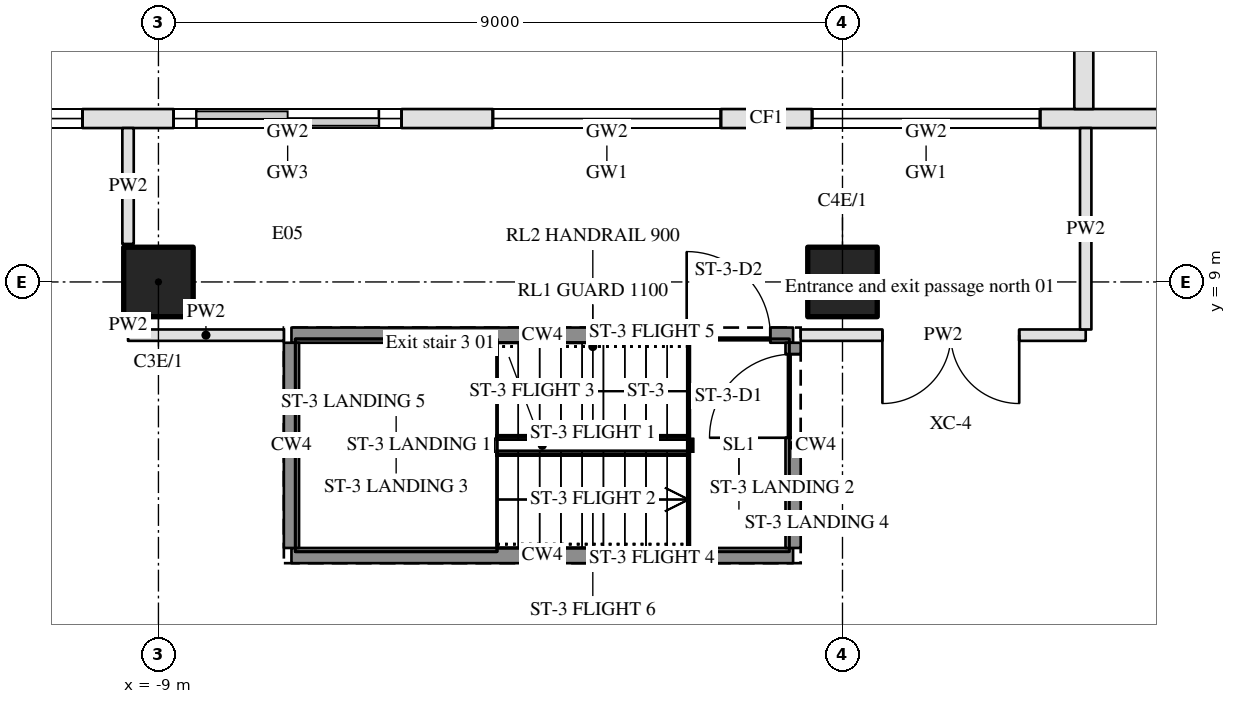
"""IFC4 building model, lengths in metres.
Left out: names, types, materials, properties, quantities, classifications, styles, units other than length and angle.
Written with IfcOpenShell. Run it as: python <this file> out.ifc"""

import sys

from ifc_helpers import new_model, si_unit, direction, frame, frame_2d, origin, origin_2d, place, context, subcontext, project, spatial, rectangle, hollow_circle, extrude, element, fill, save


model = new_model("IFC4")
c1 = context("Model", 3, precision=1e-05, world=origin(), true_north=direction((0.0, 1.0)))
c2 = subcontext(c1, "Body", "Model", "MODEL_VIEW")
j1 = project(units=[si_unit("LENGTHUNIT", "METRE"), si_unit("PLANEANGLEUNIT", "RADIAN")], contexts=[c1])
p1 = place(None, origin())
s1 = spatial("IfcSite", under=j1, at=p1, CompositionType="ELEMENT")
p2 = place(p1, origin())
s2 = spatial("IfcBuilding", under=s1, at=p2, CompositionType="ELEMENT")
p3 = place(p2, origin())
s3 = spatial("IfcBuildingStorey", under=s2, at=p3, CompositionType="ELEMENT", Elevation=0.0)
for number, where, z_axis, x_axis in (
    (1, (-9.0, 9.0, 0.0), (0.0, 0.0, 1.0), (1.0, 0.0, 0.0)),
    (2, (0.0, 9.0, 0.0), (0.0, 0.0, 1.0), (1.0, 0.0, 0.0)),
):
    element("IfcColumn", number, at=place(p3, frame(where, z_axis=z_axis, x_axis=x_axis)), inside=s3, PredefinedType="COLUMN", context=c2, shape_type="SweptSolid", body=[
        extrude(hollow_circle(Radius=0.457, WallThickness=0.05, at=origin_2d()), origin(), (0.0, 0.0, 1.0), 10.8),
    ])
p4 = place(p3, frame((20.125, 11.15, 0.0), z_axis=(0.0, 0.0, 1.0), x_axis=(-1.0, 0.0, 0.0)))
e3 = element("IfcWall", 3, at=p4, inside=s3, PredefinedType="STANDARD", context=c2, shape_type="SweptSolid", body=[
    extrude(rectangle(XDim=42.25, YDim=0.25, at=frame_2d((21.125, 0.0))), origin(), (0.0, 0.0, 1.0), 10.0),
])
p5 = place(p4, frame((0.725, 0.0, 0.15)))
e4 = element("IfcOpeningElement", 4, at=p5, cuts=e3, PredefinedType="OPENING", context=c2, shape_type="SweptSolid", body=[
    extrude(rectangle(XDim=3.0, YDim=4.2, at=frame_2d((1.5, 2.1))), frame((0.0, 0.135, 0.0), z_axis=(0.0, -1.0, 0.0), x_axis=(1.0, 0.0, 0.0)), (0.0, 0.0, 1.0), 0.27),
])
p6 = place(p4, frame((0.725, 0.0, 4.95)))
e5 = element("IfcOpeningElement", 5, at=p6, cuts=e3, PredefinedType="OPENING", context=c2, shape_type="SweptSolid", body=[
    extrude(rectangle(XDim=3.0, YDim=4.4, at=frame_2d((1.5, 2.2))), frame((0.0, 0.135, 0.0), z_axis=(0.0, -1.0, 0.0), x_axis=(1.0, 0.0, 0.0)), (0.0, 0.0, 1.0), 0.27),
])
p7 = place(p4, frame((4.925, 0.0, 0.15)))
e6 = element("IfcOpeningElement", 6, at=p7, cuts=e3, PredefinedType="OPENING", context=c2, shape_type="SweptSolid", body=[
    extrude(rectangle(XDim=3.0, YDim=4.2, at=frame_2d((1.5, 2.1))), frame((0.0, 0.135, 0.0), z_axis=(0.0, -1.0, 0.0), x_axis=(1.0, 0.0, 0.0)), (0.0, 0.0, 1.0), 0.27),
])
p8 = place(p4, frame((4.925, 0.0, 4.95)))
e7 = element("IfcOpeningElement", 7, at=p8, cuts=e3, PredefinedType="OPENING", context=c2, shape_type="SweptSolid", body=[
    extrude(rectangle(XDim=3.0, YDim=4.4, at=frame_2d((1.5, 2.2))), frame((0.0, 0.135, 0.0), z_axis=(0.0, -1.0, 0.0), x_axis=(1.0, 0.0, 0.0)), (0.0, 0.0, 1.0), 0.27),
])
p9 = place(p4, frame((9.125, 0.0, 0.15)))
e8 = element("IfcOpeningElement", 8, at=p9, cuts=e3, PredefinedType="OPENING", context=c2, shape_type="SweptSolid", body=[
    extrude(rectangle(XDim=3.0, YDim=4.2, at=frame_2d((1.5, 2.1))), frame((0.0, 0.135, 0.0), z_axis=(0.0, -1.0, 0.0), x_axis=(1.0, 0.0, 0.0)), (0.0, 0.0, 1.0), 0.27),
])
p10 = place(p4, frame((9.125, 0.0, 4.95)))
e9 = element("IfcOpeningElement", 9, at=p10, cuts=e3, PredefinedType="OPENING", context=c2, shape_type="SweptSolid", body=[
    extrude(rectangle(XDim=3.0, YDim=4.4, at=frame_2d((1.5, 2.2))), frame((0.0, 0.135, 0.0), z_axis=(0.0, -1.0, 0.0), x_axis=(1.0, 0.0, 0.0)), (0.0, 0.0, 1.0), 0.27),
])
p11 = place(p4, frame((13.925, 0.0, 0.0)))
e10 = element("IfcOpeningElement", 10, at=p11, cuts=e3, PredefinedType="OPENING", context=c2, shape_type="SweptSolid", body=[
    extrude(rectangle(XDim=1.8, YDim=2.4, at=frame_2d((0.9, 1.2))), frame((0.0, 0.135, 0.0), z_axis=(0.0, -1.0, 0.0), x_axis=(1.0, 0.0, 0.0)), (0.0, 0.0, 1.0), 0.27),
])
p12 = place(p4, frame((17.525, 0.0, 0.15)))
e11 = element("IfcOpeningElement", 11, at=p12, cuts=e3, PredefinedType="OPENING", context=c2, shape_type="SweptSolid", body=[
    extrude(rectangle(XDim=3.0, YDim=4.2, at=frame_2d((1.5, 2.1))), frame((0.0, 0.135, 0.0), z_axis=(0.0, -1.0, 0.0), x_axis=(1.0, 0.0, 0.0)), (0.0, 0.0, 1.0), 0.27),
])
p13 = place(p4, frame((17.525, 0.0, 4.95)))
e12 = element("IfcOpeningElement", 12, at=p13, cuts=e3, PredefinedType="OPENING", context=c2, shape_type="SweptSolid", body=[
    extrude(rectangle(XDim=3.0, YDim=4.4, at=frame_2d((1.5, 2.2))), frame((0.0, 0.135, 0.0), z_axis=(0.0, -1.0, 0.0), x_axis=(1.0, 0.0, 0.0)), (0.0, 0.0, 1.0), 0.27),
])
p14 = place(p4, frame((21.725, 0.0, 0.15)))
e13 = element("IfcOpeningElement", 13, at=p14, cuts=e3, PredefinedType="OPENING", context=c2, shape_type="SweptSolid", body=[
    extrude(rectangle(XDim=3.0, YDim=4.2, at=frame_2d((1.5, 2.1))), frame((0.0, 0.135, 0.0), z_axis=(0.0, -1.0, 0.0), x_axis=(1.0, 0.0, 0.0)), (0.0, 0.0, 1.0), 0.27),
])
p15 = place(p4, frame((21.725, 0.0, 4.95)))
e14 = element("IfcOpeningElement", 14, at=p15, cuts=e3, PredefinedType="OPENING", context=c2, shape_type="SweptSolid", body=[
    extrude(rectangle(XDim=3.0, YDim=4.4, at=frame_2d((1.5, 2.2))), frame((0.0, 0.135, 0.0), z_axis=(0.0, -1.0, 0.0), x_axis=(1.0, 0.0, 0.0)), (0.0, 0.0, 1.0), 0.27),
])
p16 = place(p4, frame((26.225, 0.0, 0.0)))
e15 = element("IfcOpeningElement", 15, at=p16, cuts=e3, PredefinedType="OPENING", context=c2, shape_type="SweptSolid", body=[
    extrude(rectangle(XDim=2.4, YDim=2.6, at=frame_2d((1.2, 1.3))), frame((0.0, 0.135, 0.0), z_axis=(0.0, -1.0, 0.0), x_axis=(1.0, 0.0, 0.0)), (0.0, 0.0, 1.0), 0.27),
])
p17 = place(p4, frame((25.925, 0.0, 2.9)))
e16 = element("IfcOpeningElement", 16, at=p17, cuts=e3, PredefinedType="OPENING", context=c2, shape_type="SweptSolid", body=[
    extrude(rectangle(XDim=3.0, YDim=1.45, at=frame_2d((1.5, 0.725))), frame((0.0, 0.135, 0.0), z_axis=(0.0, -1.0, 0.0), x_axis=(1.0, 0.0, 0.0)), (0.0, 0.0, 1.0), 0.27),
])
p18 = place(p4, frame((25.925, 0.0, 4.95)))
e17 = element("IfcOpeningElement", 17, at=p18, cuts=e3, PredefinedType="OPENING", context=c2, shape_type="SweptSolid", body=[
    extrude(rectangle(XDim=3.0, YDim=4.4, at=frame_2d((1.5, 2.2))), frame((0.0, 0.135, 0.0), z_axis=(0.0, -1.0, 0.0), x_axis=(1.0, 0.0, 0.0)), (0.0, 0.0, 1.0), 0.27),
])
p19 = place(p4, frame((30.125, 0.0, 0.15)))
e18 = element("IfcOpeningElement", 18, at=p19, cuts=e3, PredefinedType="OPENING", context=c2, shape_type="SweptSolid", body=[
    extrude(rectangle(XDim=3.0, YDim=4.2, at=frame_2d((1.5, 2.1))), frame((0.0, 0.135, 0.0), z_axis=(0.0, -1.0, 0.0), x_axis=(1.0, 0.0, 0.0)), (0.0, 0.0, 1.0), 0.27),
])
p20 = place(p4, frame((30.125, 0.0, 4.95)))
e19 = element("IfcOpeningElement", 19, at=p20, cuts=e3, PredefinedType="OPENING", context=c2, shape_type="SweptSolid", body=[
    extrude(rectangle(XDim=3.0, YDim=4.4, at=frame_2d((1.5, 2.2))), frame((0.0, 0.135, 0.0), z_axis=(0.0, -1.0, 0.0), x_axis=(1.0, 0.0, 0.0)), (0.0, 0.0, 1.0), 0.27),
])
p21 = place(p4, frame((34.325, 0.0, 0.15)))
e20 = element("IfcOpeningElement", 20, at=p21, cuts=e3, PredefinedType="OPENING", context=c2, shape_type="SweptSolid", body=[
    extrude(rectangle(XDim=3.0, YDim=4.2, at=frame_2d((1.5, 2.1))), frame((0.0, 0.135, 0.0), z_axis=(0.0, -1.0, 0.0), x_axis=(1.0, 0.0, 0.0)), (0.0, 0.0, 1.0), 0.27),
])
p22 = place(p4, frame((34.325, 0.0, 4.95)))
e21 = element("IfcOpeningElement", 21, at=p22, cuts=e3, PredefinedType="OPENING", context=c2, shape_type="SweptSolid", body=[
    extrude(rectangle(XDim=3.0, YDim=4.4, at=frame_2d((1.5, 2.2))), frame((0.0, 0.135, 0.0), z_axis=(0.0, -1.0, 0.0), x_axis=(1.0, 0.0, 0.0)), (0.0, 0.0, 1.0), 0.27),
])
p23 = place(p4, frame((38.525, 0.0, 0.15)))
e22 = element("IfcOpeningElement", 22, at=p23, cuts=e3, PredefinedType="OPENING", context=c2, shape_type="SweptSolid", body=[
    extrude(rectangle(XDim=3.0, YDim=4.2, at=frame_2d((1.5, 2.1))), frame((0.0, 0.135, 0.0), z_axis=(0.0, -1.0, 0.0), x_axis=(1.0, 0.0, 0.0)), (0.0, 0.0, 1.0), 0.27),
])
p24 = place(p4, frame((38.525, 0.0, 4.95)))
e23 = element("IfcOpeningElement", 23, at=p24, cuts=e3, PredefinedType="OPENING", context=c2, shape_type="SweptSolid", body=[
    extrude(rectangle(XDim=3.0, YDim=4.4, at=frame_2d((1.5, 2.2))), frame((0.0, 0.135, 0.0), z_axis=(0.0, -1.0, 0.0), x_axis=(1.0, 0.0, 0.0)), (0.0, 0.0, 1.0), 0.27),
])
p25 = place(p3, frame((3.175, 11.275, 0.0), z_axis=(0.0, 0.0, 1.0), x_axis=(0.0, 1.0, 0.0)))
e24 = element("IfcWall", 24, at=p25, inside=s3, PredefinedType="STANDARD", context=c2, shape_type="SweptSolid", body=[
    extrude(rectangle(XDim=12.0, YDim=0.25, at=frame_2d((6.0, 0.0))), origin(), (0.0, 0.0, 1.0), 10.0),
])
p26 = place(p3, frame((-7.25, 5.4, 0.0), z_axis=(0.0, 0.0, 1.0), x_axis=(1.0, 0.0, 0.0)))
e25 = element("IfcWall", 25, at=p26, inside=s3, PredefinedType="SHEAR", context=c2, shape_type="SweptSolid", body=[
    extrude(rectangle(XDim=6.6, YDim=0.2, at=frame_2d((3.3, 0.0))), origin(), (0.0, 0.0, 1.0), 10.8),
])
p27 = place(p3, frame((-9.4, 8.3, 0.0), z_axis=(0.0, 0.0, 1.0), x_axis=(1.0, 0.0, 0.0)))
e26 = element("IfcWall", 26, at=p27, inside=s3, PredefinedType="PARTITIONING", context=c2, shape_type="SweptSolid", body=[
    extrude(rectangle(XDim=2.05, YDim=0.15, at=frame_2d((1.025, 0.0))), origin(), (0.0, 0.0, 1.0), 9.86),
])
p28 = place(p3, frame((-7.25, 8.3, 0.0), z_axis=(0.0, 0.0, 1.0), x_axis=(1.0, 0.0, 0.0)))
e27 = element("IfcWall", 27, at=p28, inside=s3, PredefinedType="SHEAR", context=c2, shape_type="SweptSolid", body=[
    extrude(rectangle(XDim=6.6, YDim=0.2, at=frame_2d((3.3, 0.0))), origin(), (0.0, 0.0, 1.0), 10.8),
])
p29 = place(p28, frame((5.2, 0.0, 0.0)))
e28 = element("IfcOpeningElement", 28, at=p29, cuts=e27, PredefinedType="OPENING", context=c2, shape_type="SweptSolid", body=[
    extrude(rectangle(XDim=1.1, YDim=2.1, at=frame_2d((0.55, 1.05))), frame((0.0, 0.11, 0.0), z_axis=(0.0, -1.0, 0.0), x_axis=(1.0, 0.0, 0.0)), (0.0, 0.0, 1.0), 0.22),
])
p30 = place(p3, frame((3.2, 8.3, 0.0), z_axis=(0.0, 0.0, 1.0), x_axis=(-1.0, 0.0, 0.0)))
e29 = element("IfcWall", 29, at=p30, inside=s3, PredefinedType="PARTITIONING", context=c2, shape_type="SweptSolid", body=[
    extrude(rectangle(XDim=3.75, YDim=0.15, at=frame_2d((1.875, 0.0))), origin(), (0.0, 0.0, 1.0), 9.86),
])
p31 = place(p30, frame((0.875, 0.0, 0.0)))
e30 = element("IfcOpeningElement", 30, at=p31, cuts=e29, PredefinedType="OPENING", context=c2, shape_type="SweptSolid", body=[
    extrude(rectangle(XDim=1.8, YDim=2.1, at=frame_2d((0.9, 1.05))), frame((0.0, 0.085, 0.0), z_axis=(0.0, -1.0, 0.0), x_axis=(1.0, 0.0, 0.0)), (0.0, 0.0, 1.0), 0.17),
])
p32 = place(p3, frame((-9.4, 8.375, 0.0), z_axis=(0.0, 0.0, 1.0), x_axis=(0.0, 1.0, 0.0)))
e31 = element("IfcWall", 31, at=p32, inside=s3, PredefinedType="PARTITIONING", context=c2, shape_type="SweptSolid", body=[
    extrude(rectangle(XDim=0.125, YDim=0.15, at=frame_2d((0.062, 0.0))), origin(), (0.0, 0.0, 1.0), 9.86),
])
p33 = place(p3, frame((-9.4, 9.5, 0.0), z_axis=(0.0, 0.0, 1.0), x_axis=(0.0, 1.0, 0.0)))
e32 = element("IfcWall", 32, at=p33, inside=s3, PredefinedType="PARTITIONING", context=c2, shape_type="SweptSolid", body=[
    extrude(rectangle(XDim=1.525, YDim=0.15, at=frame_2d((0.762, 0.0))), origin(), (0.0, 0.0, 1.0), 9.86),
])
p34 = place(p3, frame((-7.25, 5.5, 0.0), z_axis=(0.0, 0.0, 1.0), x_axis=(0.0, 1.0, 0.0)))
e33 = element("IfcWall", 33, at=p34, inside=s3, PredefinedType="SHEAR", context=c2, shape_type="SweptSolid", body=[
    extrude(rectangle(XDim=2.7, YDim=0.2, at=frame_2d((1.35, 0.0))), origin(), (0.0, 0.0, 1.0), 10.8),
])
p35 = place(p3, frame((-0.65, 5.5, 0.0), z_axis=(0.0, 0.0, 1.0), x_axis=(0.0, 1.0, 0.0)))
e34 = element("IfcWall", 34, at=p35, inside=s3, PredefinedType="SHEAR", context=c2, shape_type="SweptSolid", body=[
    extrude(rectangle(XDim=2.7, YDim=0.2, at=frame_2d((1.35, 0.0))), origin(), (0.0, 0.0, 1.0), 10.8),
])
p36 = place(p35, frame((1.45, 0.0, 0.0)))
e35 = element("IfcOpeningElement", 35, at=p36, cuts=e34, PredefinedType="OPENING", context=c2, shape_type="SweptSolid", body=[
    extrude(rectangle(XDim=1.1, YDim=2.1, at=frame_2d((0.55, 1.05))), frame((0.0, 0.11, 0.0), z_axis=(0.0, -1.0, 0.0), x_axis=(1.0, 0.0, 0.0)), (0.0, 0.0, 1.0), 0.22),
])
p37 = place(p3, frame((3.2, 8.375, 0.0), z_axis=(0.0, 0.0, 1.0), x_axis=(0.0, 1.0, 0.0)))
e36 = element("IfcWall", 36, at=p37, inside=s3, PredefinedType="PARTITIONING", context=c2, shape_type="SweptSolid", body=[
    extrude(rectangle(XDim=2.65, YDim=0.15, at=frame_2d((1.325, 0.0))), origin(), (0.0, 0.0, 1.0), 9.86),
])
p38 = place(p12, origin())
e37 = element("IfcWindow", 37, at=p38, inside=s3, PartitioningType="DOUBLE_PANEL_HORIZONTAL", PredefinedType="WINDOW", context=c2, shape_type="SweptSolid", body=[
    extrude(rectangle(XDim=3.0, YDim=4.2, at=frame_2d((1.5, 2.1))), frame((0.0, 0.03, 0.0), z_axis=(0.0, -1.0, 0.0), x_axis=(1.0, 0.0, 0.0)), (0.0, 0.0, 1.0), 0.06),
])
fill(e11, e37)
p39 = place(p13, origin())
e38 = element("IfcWindow", 38, at=p39, inside=s3, PartitioningType="DOUBLE_PANEL_HORIZONTAL", PredefinedType="WINDOW", context=c2, shape_type="SweptSolid", body=[
    extrude(rectangle(XDim=3.0, YDim=4.4, at=frame_2d((1.5, 2.2))), frame((0.0, 0.03, 0.0), z_axis=(0.0, -1.0, 0.0), x_axis=(1.0, 0.0, 0.0)), (0.0, 0.0, 1.0), 0.06),
])
fill(e12, e38)
p40 = place(p14, origin())
e39 = element("IfcWindow", 39, at=p40, inside=s3, PartitioningType="DOUBLE_PANEL_HORIZONTAL", PredefinedType="WINDOW", context=c2, shape_type="SweptSolid", body=[
    extrude(rectangle(XDim=3.0, YDim=4.2, at=frame_2d((1.5, 2.1))), frame((0.0, 0.03, 0.0), z_axis=(0.0, -1.0, 0.0), x_axis=(1.0, 0.0, 0.0)), (0.0, 0.0, 1.0), 0.06),
])
fill(e13, e39)
p41 = place(p15, origin())
e40 = element("IfcWindow", 40, at=p41, inside=s3, PartitioningType="DOUBLE_PANEL_HORIZONTAL", PredefinedType="WINDOW", context=c2, shape_type="SweptSolid", body=[
    extrude(rectangle(XDim=3.0, YDim=4.4, at=frame_2d((1.5, 2.2))), frame((0.0, 0.03, 0.0), z_axis=(0.0, -1.0, 0.0), x_axis=(1.0, 0.0, 0.0)), (0.0, 0.0, 1.0), 0.06),
])
fill(e14, e40)
p42 = place(p16, origin())
e41 = element("IfcDoor", 41, at=p42, inside=s3, OperationType="DOUBLE_DOOR_SLIDING", PredefinedType="DOOR", context=c2, shape_type="SweptSolid", body=[
    extrude(rectangle(XDim=2.4, YDim=2.6, at=frame_2d((1.2, 1.3))), frame((0.0, 0.025, 0.0), z_axis=(0.0, -1.0, 0.0), x_axis=(1.0, 0.0, 0.0)), (0.0, 0.0, 1.0), 0.05),
])
fill(e15, e41)
p43 = place(p17, origin())
e42 = element("IfcWindow", 42, at=p43, inside=s3, PartitioningType="SINGLE_PANEL", PredefinedType="WINDOW", context=c2, shape_type="SweptSolid", body=[
    extrude(rectangle(XDim=3.0, YDim=1.45, at=frame_2d((1.5, 0.725))), frame((0.0, 0.03, 0.0), z_axis=(0.0, -1.0, 0.0), x_axis=(1.0, 0.0, 0.0)), (0.0, 0.0, 1.0), 0.06),
])
fill(e16, e42)
p44 = place(p18, origin())
e43 = element("IfcWindow", 43, at=p44, inside=s3, PartitioningType="DOUBLE_PANEL_HORIZONTAL", PredefinedType="WINDOW", context=c2, shape_type="SweptSolid", body=[
    extrude(rectangle(XDim=3.0, YDim=4.4, at=frame_2d((1.5, 2.2))), frame((0.0, 0.03, 0.0), z_axis=(0.0, -1.0, 0.0), x_axis=(1.0, 0.0, 0.0)), (0.0, 0.0, 1.0), 0.06),
])
fill(e17, e43)
p45 = place(p19, origin())
e44 = element("IfcWindow", 44, at=p45, inside=s3, PartitioningType="DOUBLE_PANEL_HORIZONTAL", PredefinedType="WINDOW", context=c2, shape_type="SweptSolid", body=[
    extrude(rectangle(XDim=3.0, YDim=4.2, at=frame_2d((1.5, 2.1))), frame((0.0, 0.03, 0.0), z_axis=(0.0, -1.0, 0.0), x_axis=(1.0, 0.0, 0.0)), (0.0, 0.0, 1.0), 0.06),
])
fill(e18, e44)
p46 = place(p20, origin())
e45 = element("IfcWindow", 45, at=p46, inside=s3, PartitioningType="DOUBLE_PANEL_HORIZONTAL", PredefinedType="WINDOW", context=c2, shape_type="SweptSolid", body=[
    extrude(rectangle(XDim=3.0, YDim=4.4, at=frame_2d((1.5, 2.2))), frame((0.0, 0.03, 0.0), z_axis=(0.0, -1.0, 0.0), x_axis=(1.0, 0.0, 0.0)), (0.0, 0.0, 1.0), 0.06),
])
fill(e19, e45)
p47 = place(p36, origin())
e46 = element("IfcDoor", 46, at=p47, inside=s3, OperationType="SINGLE_SWING_LEFT", PredefinedType="DOOR", context=c2, shape_type="SweptSolid", body=[
    extrude(rectangle(XDim=1.1, YDim=2.1, at=frame_2d((0.55, 1.05))), frame((0.0, 0.025, 0.0), z_axis=(0.0, -1.0, 0.0), x_axis=(1.0, 0.0, 0.0)), (0.0, 0.0, 1.0), 0.05),
])
fill(e35, e46)
p48 = place(p29, origin())
e47 = element("IfcDoor", 47, at=p48, inside=s3, OperationType="SINGLE_SWING_LEFT", PredefinedType="DOOR", context=c2, shape_type="SweptSolid", body=[
    extrude(rectangle(XDim=1.1, YDim=2.1, at=frame_2d((0.55, 1.05))), frame((0.0, 0.025, 0.0), z_axis=(0.0, -1.0, 0.0), x_axis=(1.0, 0.0, 0.0)), (0.0, 0.0, 1.0), 0.05),
])
fill(e28, e47)
p49 = place(p31, origin())
e48 = element("IfcDoor", 48, at=p49, inside=s3, OperationType="DOUBLE_DOOR_SINGLE_SWING", PredefinedType="DOOR", context=c2, shape_type="SweptSolid", body=[
    extrude(rectangle(XDim=1.8, YDim=2.1, at=frame_2d((0.9, 1.05))), frame((0.0, 0.025, 0.0), z_axis=(0.0, -1.0, 0.0), x_axis=(1.0, 0.0, 0.0)), (0.0, 0.0, 1.0), 0.05),
])
fill(e30, e48)
save(model, sys.argv[1])
